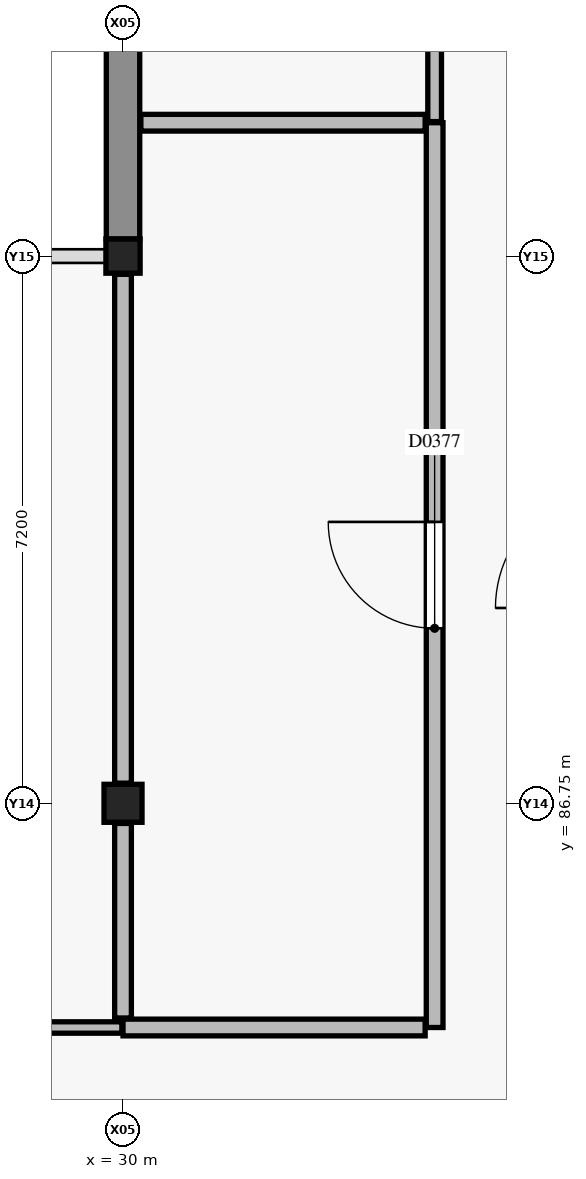
"""IFC4 building model, lengths in metres.
Left out: names, types, materials, properties, quantities, classifications, styles, units other than length and angle.
Written with IfcOpenShell. Run it as: python <this file> out.ifc"""

import sys

from ifc_helpers import new_model, si_unit, direction, frame, frame_2d, origin, origin_2d, place, context, subcontext, project, spatial, rectangle, extrude, element, fill, save


model = new_model("IFC4")
c1 = context("Model", 3, precision=1e-05, world=origin(), true_north=direction((0.0, 1.0)))
c2 = subcontext(c1, "Body", "Model", "MODEL_VIEW")
j1 = project(units=[si_unit("LENGTHUNIT", "METRE"), si_unit("PLANEANGLEUNIT", "RADIAN")], contexts=[c1])
p1 = place(None, origin())
s1 = spatial("IfcSite", under=j1, at=p1, CompositionType="ELEMENT")
p2 = place(p1, origin())
s2 = spatial("IfcBuilding", under=s1, at=p2, CompositionType="ELEMENT")
p3 = place(p2, frame((0.0, 0.0, 9.0)))
s3 = spatial("IfcBuildingStorey", under=s2, at=p3, CompositionType="ELEMENT", Elevation=9.0)
p4 = place(p3, frame((30.0, 86.75, 0.0), z_axis=(0.0, 0.0, 1.0), x_axis=(1.0, 0.0, 0.0)))
e1 = element("IfcColumn", 1, at=p4, inside=s3, PredefinedType="COLUMN", context=c2, shape_type="SweptSolid", body=[
    extrude(rectangle(XDim=0.5, YDim=0.5, at=origin_2d()), origin(), (0.0, 0.0, 1.0), 4.2),
])
p5 = place(p3, frame((30.0, 93.95, 0.0), z_axis=(0.0, 0.0, 1.0), x_axis=(1.0, 0.0, 0.0)))
e2 = element("IfcColumn", 2, at=p5, inside=s3, PredefinedType="COLUMN", context=c2, shape_type="SweptSolid", body=[
    extrude(rectangle(XDim=0.45, YDim=0.45, at=origin_2d()), origin(), (0.0, 0.0, 1.0), 4.2),
])
p6 = place(p3, frame((30.0, 94.175, 0.0), z_axis=(0.0, 0.0, 1.0), x_axis=(0.0, 1.0, 0.0)))
e3 = element("IfcWall", 3, at=p6, inside=s3, PredefinedType="USERDEFINED", context=c2, shape_type="SweptSolid", body=[
    extrude(rectangle(XDim=6.525, YDim=0.44, at=frame_2d((3.262, 0.0))), origin(), (0.0, 0.0, 1.0), 3.13),
])
p7 = place(p6, frame((2.802, 0.0, 0.9)))
e4 = element("IfcOpeningElement", 4, at=p7, cuts=e3, PredefinedType="OPENING", context=c2, shape_type="SweptSolid", body=[
    extrude(rectangle(XDim=2.1, YDim=1.8, at=frame_2d((1.05, 0.9))), frame((0.0, 0.23, 0.0), z_axis=(0.0, -1.0, 0.0), x_axis=(1.0, 0.0, 0.0)), (0.0, 0.0, 1.0), 0.46),
])
p8 = place(p3, frame((34.1, 83.8, 0.0), z_axis=(0.0, 0.0, 1.0), x_axis=(0.0, 1.0, 0.0)))
e5 = element("IfcWall", 5, at=p8, inside=s3, PredefinedType="PARTITIONING", context=c2, shape_type="SweptSolid", body=[
    extrude(rectangle(XDim=11.905, YDim=0.22, at=frame_2d((5.953, 0.0))), origin(), (0.0, 0.0, 1.0), 3.135),
])
p9 = place(p8, frame((5.252, 0.0, 0.0)))
e6 = element("IfcOpeningElement", 6, at=p9, cuts=e5, PredefinedType="OPENING", context=c2, shape_type="SweptSolid", body=[
    extrude(rectangle(XDim=1.4, YDim=2.2, at=frame_2d((0.7, 1.1))), frame((0.0, 0.12, 0.0), z_axis=(0.0, -1.0, 0.0), x_axis=(1.0, 0.0, 0.0)), (0.0, 0.0, 1.0), 0.24),
])
p10 = place(p3, frame((30.0, 83.8, 0.0), z_axis=(0.0, 0.0, 1.0), x_axis=(1.0, 0.0, 0.0)))
e7 = element("IfcWall", 7, at=p10, inside=s3, PredefinedType="PARTITIONING", context=c2, shape_type="SweptSolid", body=[
    extrude(rectangle(XDim=3.975, YDim=0.22, at=frame_2d((1.988, 0.0))), origin(), (0.0, 0.0, 1.0), 3.385),
])
p11 = place(p3, frame((34.1, 95.72, 0.0), z_axis=(0.0, 0.0, 1.0), x_axis=(0.0, 1.0, 0.0)))
e8 = element("IfcWall", 8, at=p11, inside=s3, PredefinedType="PLUMBINGWALL", context=c2, shape_type="SweptSolid", body=[
    extrude(rectangle(XDim=4.63, YDim=0.18, at=frame_2d((2.315, 0.0))), origin(), (0.0, 0.0, 1.0), 3.475),
])
p12 = place(p11, frame((1.84, 0.0, 0.0)))
e9 = element("IfcOpeningElement", 9, at=p12, cuts=e8, PredefinedType="OPENING", context=c2, shape_type="SweptSolid", body=[
    extrude(rectangle(XDim=0.95, YDim=2.1, at=frame_2d((0.475, 1.05))), frame((0.0, 0.1, 0.0), z_axis=(0.0, -1.0, 0.0), x_axis=(1.0, 0.0, 0.0)), (0.0, 0.0, 1.0), 0.2),
])
p13 = place(p3, frame((25.2, 83.8, 0.0), z_axis=(0.0, 0.0, 1.0), x_axis=(1.0, 0.0, 0.0)))
e10 = element("IfcWall", 10, at=p13, inside=s3, PredefinedType="PARTITIONING", context=c2, shape_type="SweptSolid", body=[
    extrude(rectangle(XDim=4.785, YDim=0.15, at=frame_2d((2.393, 0.0))), origin(), (0.0, 0.0, 1.0), 3.385),
])
p14 = place(p3, frame((30.0, 83.925, 0.0), z_axis=(0.0, 0.0, 1.0), x_axis=(0.0, 1.0, 0.0)))
e11 = element("IfcWall", 11, at=p14, inside=s3, PredefinedType="PARTITIONING", context=c2, shape_type="SweptSolid", body=[
    extrude(rectangle(XDim=2.56, YDim=0.22, at=frame_2d((1.28, 0.0))), origin(), (0.0, 0.0, 1.0), 3.385),
])
p15 = place(p3, frame((30.0, 87.015, 0.0), z_axis=(0.0, 0.0, 1.0), x_axis=(0.0, 1.0, 0.0)))
e12 = element("IfcWall", 12, at=p15, inside=s3, PredefinedType="PARTITIONING", context=c2, shape_type="SweptSolid", body=[
    extrude(rectangle(XDim=6.695, YDim=0.22, at=frame_2d((3.348, 0.0))), origin(), (0.0, 0.0, 1.0), 3.135),
])
p16 = place(p3, frame((30.235, 95.705, 0.0), z_axis=(0.0, 0.0, 1.0), x_axis=(1.0, 0.0, 0.0)))
e13 = element("IfcWall", 13, at=p16, inside=s3, PredefinedType="PARTITIONING", context=c2, shape_type="SweptSolid", body=[
    extrude(rectangle(XDim=3.74, YDim=0.22, at=frame_2d((1.87, 0.0))), origin(), (0.0, 0.0, 1.0), 3.95),
])
p17 = place(p9, origin())
e14 = element("IfcDoor", 14, at=p17, inside=s3, OperationType="SINGLE_SWING_RIGHT", PredefinedType="DOOR", context=c2, shape_type="SweptSolid", body=[
    extrude(rectangle(XDim=1.4, YDim=2.2, at=frame_2d((0.7, 1.1))), frame((0.0, 0.025, 0.0), z_axis=(0.0, -1.0, 0.0), x_axis=(1.0, 0.0, 0.0)), (0.0, 0.0, 1.0), 0.05),
])
fill(e6, e14)
save(model, sys.argv[1])
